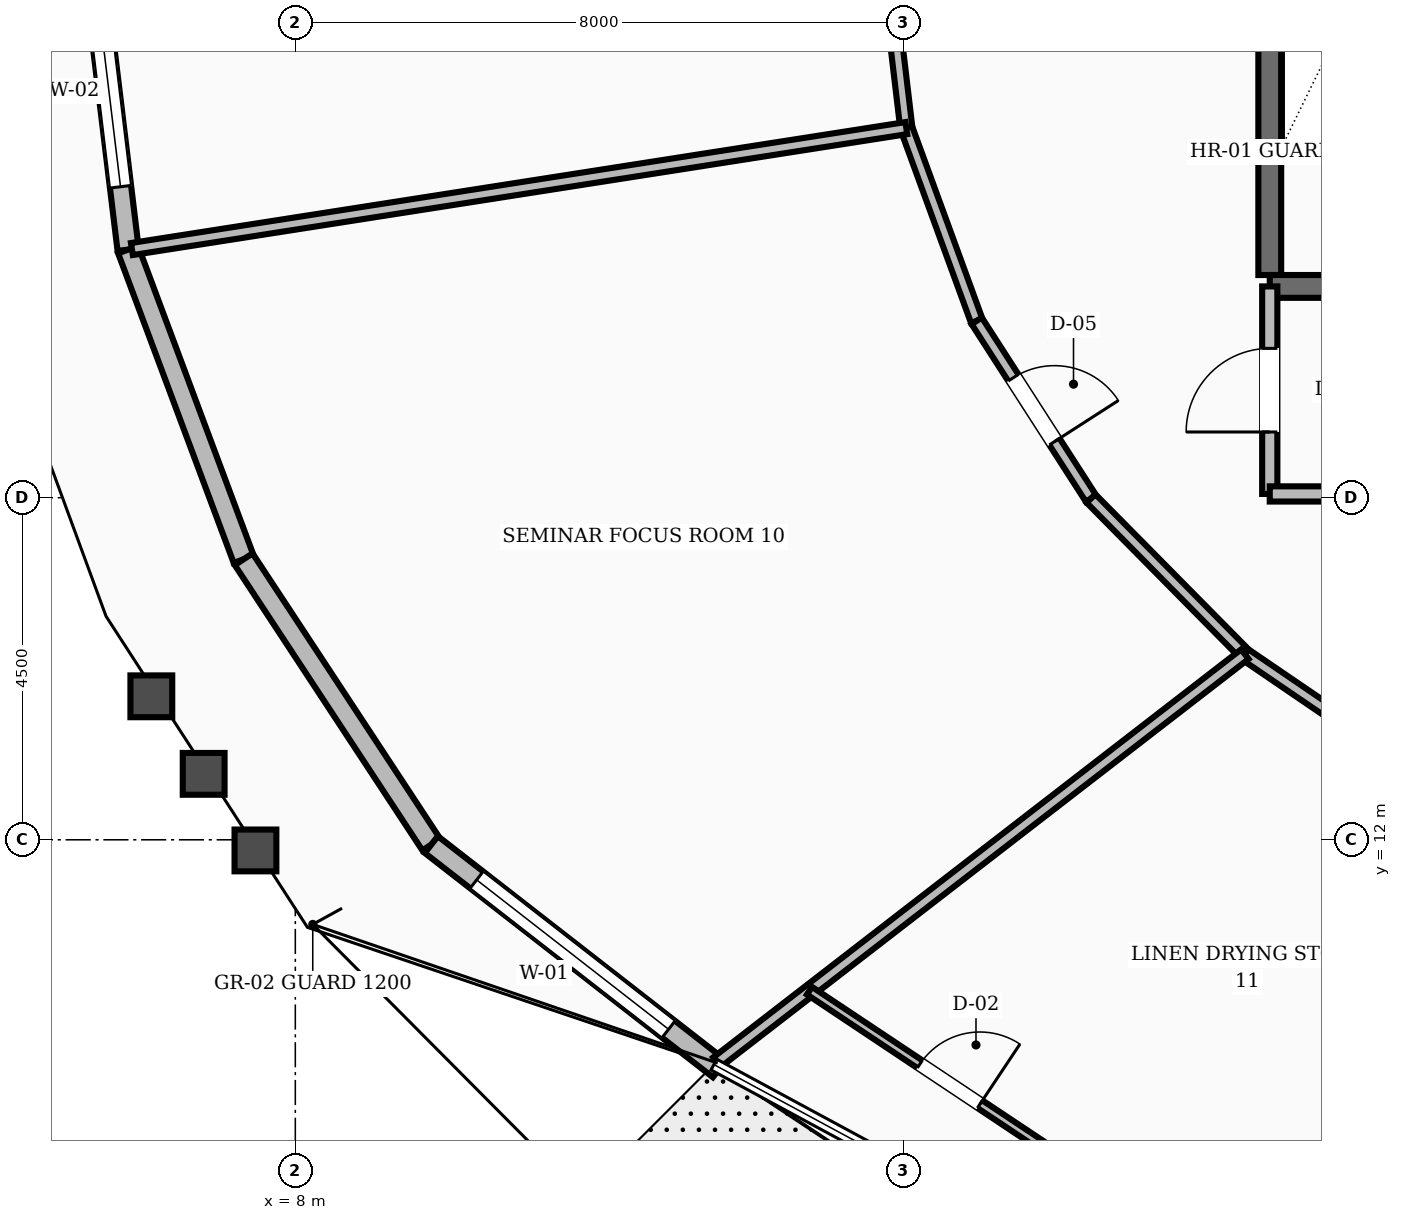
"""IFC4 building model, lengths in metres.
Left out: names, types, materials, properties, quantities, classifications, styles, units other than length and angle.
Written with IfcOpenShell. Run it as: python <this file> out.ifc"""

import sys

from ifc_helpers import new_model, si_unit, direction, frame, frame_2d, origin, place, context, subcontext, project, spatial, rectangle, extrude, element, fill, save


model = new_model("IFC4")
c1 = context("Model", 3, precision=1e-05, world=origin(), true_north=direction((0.0, 1.0)))
c2 = subcontext(c1, "Body", "Model", "MODEL_VIEW")
j1 = project(units=[si_unit("LENGTHUNIT", "METRE"), si_unit("PLANEANGLEUNIT", "RADIAN")], contexts=[c1])
p1 = place(None, origin())
s1 = spatial("IfcSite", under=j1, at=p1, CompositionType="ELEMENT")
p2 = place(p1, origin())
s2 = spatial("IfcBuilding", under=s1, at=p2, CompositionType="ELEMENT")
p3 = place(p2, frame((0.0, 0.0, 59.2)))
s3 = spatial("IfcBuildingStorey", under=s2, at=p3, CompositionType="ELEMENT", Elevation=59.2)
p4 = place(p3, frame((20.82, 19.43, 0.0), z_axis=(0.0, 0.0, 1.0), x_axis=(0.0, 1.0, 0.0)))
e1 = element("IfcWall", 1, at=p4, inside=s3, PredefinedType="SHEAR", context=c2, shape_type="SweptSolid", body=[
    extrude(rectangle(XDim=8.74, YDim=0.3, at=frame_2d((4.37, 0.0))), origin(), (0.0, 0.0, 1.0), 3.6),
])
p5 = place(p3, frame((20.82, 19.28, 0.0), z_axis=(0.0, 0.0, 1.0), x_axis=(1.0, 0.0, 0.0)))
e2 = element("IfcWall", 2, at=p5, inside=s3, PredefinedType="SHEAR", context=c2, shape_type="SweptSolid", body=[
    extrude(rectangle(XDim=3.6, YDim=0.3, at=frame_2d((1.8, 0.0))), origin(), (0.0, 0.0, 1.0), 3.6),
])
p6 = place(p5, frame((1.3, 0.0, 0.0)))
e3 = element("IfcOpeningElement", 3, at=p6, cuts=e2, PredefinedType="OPENING", context=c2, shape_type="SweptSolid", body=[
    extrude(rectangle(XDim=1.1, YDim=2.1, at=frame_2d((0.55, 1.05))), frame((0.0, 0.16, 0.0), z_axis=(0.0, -1.0, 0.0), x_axis=(1.0, 0.0, 0.0)), (0.0, 0.0, 1.0), 0.32),
])
p7 = place(p3, frame((5.287, 24.0, 0.0), z_axis=(0.0, 0.0, 1.0), x_axis=(0.120273268537, -0.992740822609, 0.0)))
e4 = element("IfcWall", 4, at=p7, inside=s3, PredefinedType="STANDARD", context=c2, shape_type="SweptSolid", body=[
    extrude(rectangle(XDim=4.267, YDim=0.28, at=frame_2d((2.133, 0.0))), origin(), (0.0, 0.0, 1.0), 2.65),
])
p8 = place(p7, frame((0.833, 0.0, 0.8)))
e5 = element("IfcOpeningElement", 5, at=p8, cuts=e4, PredefinedType="OPENING", context=c2, shape_type="SweptSolid", body=[
    extrude(rectangle(XDim=2.6, YDim=1.65, at=frame_2d((1.3, 0.825))), frame((0.0, 0.15, 0.0), z_axis=(0.0, -1.0, 0.0), x_axis=(1.0, 0.0, 0.0)), (0.0, 0.0, 1.0), 0.3),
])
p9 = place(p3, frame((5.801, 19.764, 0.0), z_axis=(0.0, 0.0, 1.0), x_axis=(0.349670708584, -0.93687266774, 0.0)))
e6 = element("IfcWall", 6, at=p9, inside=s3, PredefinedType="STANDARD", context=c2, shape_type="SweptSolid", body=[
    extrude(rectangle(XDim=4.348, YDim=0.28, at=frame_2d((2.174, 0.0))), origin(), (0.0, 0.0, 1.0), 2.65),
])
p10 = place(p3, frame((7.321, 15.691, 0.0), z_axis=(0.0, 0.0, 1.0), x_axis=(0.549434846356, -0.835536563898, 0.0)))
e7 = element("IfcWall", 7, at=p10, inside=s3, PredefinedType="STANDARD", context=c2, shape_type="SweptSolid", body=[
    extrude(rectangle(XDim=4.493, YDim=0.28, at=frame_2d((2.247, 0.0))), origin(), (0.0, 0.0, 1.0), 2.65),
])
p11 = place(p3, frame((9.789, 11.937, 0.0), z_axis=(0.0, 0.0, 1.0), x_axis=(0.789100374505, -0.614264274524, 0.0)))
e8 = element("IfcWall", 8, at=p11, inside=s3, PredefinedType="STANDARD", context=c2, shape_type="SweptSolid", body=[
    extrude(rectangle(XDim=4.804, YDim=0.28, at=frame_2d((2.402, 0.0))), origin(), (0.0, 0.0, 1.0), 2.65),
])
p12 = place(p11, frame((0.756, 0.0, 0.8)))
e9 = element("IfcOpeningElement", 9, at=p12, cuts=e8, PredefinedType="OPENING", context=c2, shape_type="SweptSolid", body=[
    extrude(rectangle(XDim=3.2, YDim=1.65, at=frame_2d((1.6, 0.825))), frame((0.0, 0.15, 0.0), z_axis=(0.0, -1.0, 0.0), x_axis=(1.0, 0.0, 0.0)), (0.0, 0.0, 1.0), 0.3),
])
p13 = place(p3, frame((20.82, 16.55, 0.0), z_axis=(0.0, 0.0, 1.0), x_axis=(0.0, 1.0, 0.0)))
e10 = element("IfcWall", 10, at=p13, inside=s3, PredefinedType="SOLIDWALL", context=c2, shape_type="SweptSolid", body=[
    extrude(rectangle(XDim=2.73, YDim=0.2, at=frame_2d((1.365, 0.0))), origin(), (0.0, 0.0, 1.0), 2.61),
])
p14 = place(p13, frame((0.815, 0.0, 0.0)))
e11 = element("IfcOpeningElement", 11, at=p14, cuts=e10, PredefinedType="OPENING", context=c2, shape_type="SweptSolid", body=[
    extrude(rectangle(XDim=1.1, YDim=2.1, at=frame_2d((0.55, 1.05))), frame((0.0, 0.11, 0.0), z_axis=(0.0, -1.0, 0.0), x_axis=(1.0, 0.0, 0.0)), (0.0, 0.0, 1.0), 0.22),
])
p15 = place(p3, frame((20.82, 16.55, 0.0), z_axis=(0.0, 0.0, 1.0), x_axis=(1.0, 0.0, 0.0)))
e12 = element("IfcWall", 12, at=p15, inside=s3, PredefinedType="SOLIDWALL", context=c2, shape_type="SweptSolid", body=[
    extrude(rectangle(XDim=3.98, YDim=0.2, at=frame_2d((1.99, 0.0))), origin(), (0.0, 0.0, 1.0), 2.61),
])
p16 = place(p3, frame((15.726, 24.0, 0.0), z_axis=(0.0, 0.0, 1.0), x_axis=(0.117763961213, -0.99304161516, 0.0)))
e13 = element("IfcWall", 13, at=p16, inside=s3, PredefinedType="SOLIDWALL", context=c2, shape_type="SweptSolid", body=[
    extrude(rectangle(XDim=2.656, YDim=0.16, at=frame_2d((1.328, 0.0))), origin(), (0.0, 0.0, 1.0), 2.61),
])
p17 = place(p3, frame((16.039, 21.363, 0.0), z_axis=(0.0, 0.0, 1.0), x_axis=(0.343013437329, -0.939330496583, 0.0)))
e14 = element("IfcWall", 14, at=p17, inside=s3, PredefinedType="SOLIDWALL", context=c2, shape_type="SweptSolid", body=[
    extrude(rectangle(XDim=2.7, YDim=0.16, at=frame_2d((1.35, 0.0))), origin(), (0.0, 0.0, 1.0), 2.61),
])
p18 = place(p3, frame((16.965, 18.827, 0.0), z_axis=(0.0, 0.0, 1.0), x_axis=(0.541126045017, -0.840941498206, 0.0)))
e15 = element("IfcWall", 15, at=p18, inside=s3, PredefinedType="SOLIDWALL", context=c2, shape_type="SweptSolid", body=[
    extrude(rectangle(XDim=2.779, YDim=0.16, at=frame_2d((1.39, 0.0))), origin(), (0.0, 0.0, 1.0), 2.61),
])
p19 = place(p18, frame((0.89, 0.0, 0.0)))
e16 = element("IfcOpeningElement", 16, at=p19, cuts=e15, PredefinedType="OPENING", context=c2, shape_type="SweptSolid", body=[
    extrude(rectangle(XDim=1.0, YDim=2.1, at=frame_2d((0.5, 1.05))), frame((0.0, 0.09, 0.0), z_axis=(0.0, -1.0, 0.0), x_axis=(1.0, 0.0, 0.0)), (0.0, 0.0, 1.0), 0.18),
])
p20 = place(p3, frame((18.469, 16.49, 0.0), z_axis=(0.0, 0.0, 1.0), x_axis=(0.702811997, -0.711375636969, 0.0)))
e17 = element("IfcWall", 17, at=p20, inside=s3, PredefinedType="SOLIDWALL", context=c2, shape_type="SweptSolid", body=[
    extrude(rectangle(XDim=2.879, YDim=0.16, at=frame_2d((1.44, 0.0))), origin(), (0.0, 0.0, 1.0), 2.61),
])
p21 = place(p3, frame((20.492, 14.441, 0.0), z_axis=(0.0, 0.0, 1.0), x_axis=(0.826293096206, -0.56324037423, 0.0)))
e18 = element("IfcWall", 18, at=p21, inside=s3, PredefinedType="SOLIDWALL", context=c2, shape_type="SweptSolid", body=[
    extrude(rectangle(XDim=2.985, YDim=0.16, at=frame_2d((1.492, 0.0))), origin(), (0.0, 0.0, 1.0), 2.61),
])
p22 = place(p3, frame((16.039, 21.363, 0.0), z_axis=(0.0, 0.0, 1.0), x_axis=(-0.988025684157, -0.154289492336, 0.0)))
e19 = element("IfcWall", 19, at=p22, inside=s3, PredefinedType="SOLIDWALL", context=c2, shape_type="SweptSolid", body=[
    extrude(rectangle(XDim=10.312, YDim=0.16, at=frame_2d((5.156, 0.0))), origin(), (0.0, 0.0, 1.0), 2.61),
])
p23 = place(p3, frame((20.492, 14.441, 0.0), z_axis=(0.0, 0.0, 1.0), x_axis=(-0.791235454553, -0.611511615145, 0.0)))
e20 = element("IfcWall", 20, at=p23, inside=s3, PredefinedType="SOLIDWALL", context=c2, shape_type="SweptSolid", body=[
    extrude(rectangle(XDim=8.778, YDim=0.16, at=frame_2d((4.389, 0.0))), origin(), (0.0, 0.0, 1.0), 2.61),
])
p24 = place(p3, frame((14.765, 10.014, 0.0), z_axis=(0.0, 0.0, 1.0), x_axis=(0.832329498318, -0.554281161713, 0.0)))
e21 = element("IfcWall", 21, at=p24, inside=s3, PredefinedType="PARTITIONING", context=c2, shape_type="SweptSolid", body=[
    extrude(rectangle(XDim=4.438, YDim=0.12, at=frame_2d((2.219, 0.0))), origin(), (0.0, 0.0, 1.0), 2.61),
])
p25 = place(p24, frame((1.744, 0.0, 0.0)))
e22 = element("IfcOpeningElement", 22, at=p25, cuts=e21, PredefinedType="OPENING", context=c2, shape_type="SweptSolid", body=[
    extrude(rectangle(XDim=0.95, YDim=2.1, at=frame_2d((0.475, 1.05))), frame((0.0, 0.07, 0.0), z_axis=(0.0, -1.0, 0.0), x_axis=(1.0, 0.0, 0.0)), (0.0, 0.0, 1.0), 0.14),
])
p26 = place(p8, origin())
e23 = element("IfcWindow", 23, at=p26, inside=s3, PartitioningType="SINGLE_PANEL", PredefinedType="WINDOW", context=c2, shape_type="SweptSolid", body=[
    extrude(rectangle(XDim=2.6, YDim=1.65, at=frame_2d((1.3, 0.825))), frame((0.0, 0.03, 0.0), z_axis=(0.0, -1.0, 0.0), x_axis=(1.0, 0.0, 0.0)), (0.0, 0.0, 1.0), 0.06),
])
fill(e5, e23)
p27 = place(p12, origin())
e24 = element("IfcWindow", 24, at=p27, inside=s3, PartitioningType="SINGLE_PANEL", PredefinedType="WINDOW", context=c2, shape_type="SweptSolid", body=[
    extrude(rectangle(XDim=3.2, YDim=1.65, at=frame_2d((1.6, 0.825))), frame((0.0, 0.03, 0.0), z_axis=(0.0, -1.0, 0.0), x_axis=(1.0, 0.0, 0.0)), (0.0, 0.0, 1.0), 0.06),
])
fill(e9, e24)
p28 = place(p14, origin())
e25 = element("IfcDoor", 25, at=p28, inside=s3, OperationType="SINGLE_SWING_LEFT", PredefinedType="DOOR", context=c2, shape_type="SweptSolid", body=[
    extrude(rectangle(XDim=1.1, YDim=2.1, at=frame_2d((0.55, 1.05))), frame((0.0, 0.025, 0.0), z_axis=(0.0, -1.0, 0.0), x_axis=(1.0, 0.0, 0.0)), (0.0, 0.0, 1.0), 0.05),
])
fill(e11, e25)
p29 = place(p19, origin())
e26 = element("IfcDoor", 26, at=p29, inside=s3, OperationType="SINGLE_SWING_RIGHT", PredefinedType="DOOR", context=c2, shape_type="SweptSolid", body=[
    extrude(rectangle(XDim=1.0, YDim=2.1, at=frame_2d((0.5, 1.05))), frame((0.0, 0.025, 0.0), z_axis=(0.0, -1.0, 0.0), x_axis=(1.0, 0.0, 0.0)), (0.0, 0.0, 1.0), 0.05),
])
fill(e16, e26)
p30 = place(p25, origin())
e27 = element("IfcDoor", 27, at=p30, inside=s3, OperationType="SINGLE_SWING_RIGHT", PredefinedType="DOOR", context=c2, shape_type="SweptSolid", body=[
    extrude(rectangle(XDim=0.95, YDim=2.1, at=frame_2d((0.475, 1.05))), frame((0.0, 0.025, 0.0), z_axis=(0.0, -1.0, 0.0), x_axis=(1.0, 0.0, 0.0)), (0.0, 0.0, 1.0), 0.05),
])
fill(e22, e27)
save(model, sys.argv[1])
